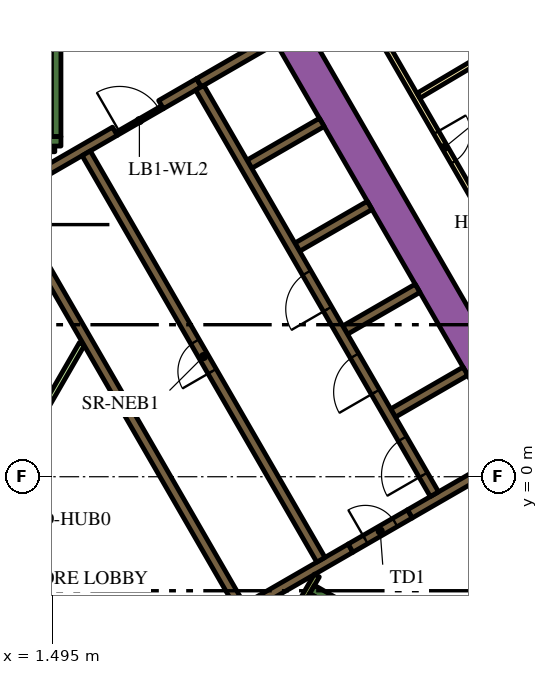
"""IFC4 building model, lengths in metres.
Left out: names, types, materials, properties, quantities, classifications, styles, units other than length and angle.
Written with IfcOpenShell. Run it as: python <this file> out.ifc"""

import sys

from ifc_helpers import new_model, si_unit, direction, frame, frame_2d, origin, place, context, subcontext, project, spatial, polyline, rectangle, outline, extrude, element, fill, save


model = new_model("IFC4")
c1 = context("Model", 3, precision=1e-05, world=origin(), true_north=direction((0.0, 1.0)))
c2 = subcontext(c1, "Body", "Model", "MODEL_VIEW")
j1 = project(units=[si_unit("LENGTHUNIT", "METRE"), si_unit("PLANEANGLEUNIT", "RADIAN")], contexts=[c1])
p1 = place(None, origin())
s1 = spatial("IfcSite", under=j1, at=p1, CompositionType="ELEMENT")
p2 = place(p1, origin())
s2 = spatial("IfcBuilding", under=s1, at=p2, CompositionType="ELEMENT")
p3 = place(p2, frame((0.0, 0.0, 83.7)))
s3 = spatial("IfcBuildingStorey", under=s2, at=p3, CompositionType="ELEMENT", Elevation=83.7)
p4 = place(p3, frame((6.776, 13.364, 0.0), z_axis=(0.0, 0.0, 1.0), x_axis=(0.500004177138, -0.8660229921, 0.0)))
e1 = element("IfcWall", 1, at=p4, inside=s3, PredefinedType="SOLIDWALL", context=c2, shape_type="SweptSolid", body=[
    extrude(rectangle(XDim=20.204, YDim=0.9, at=frame_2d((10.102, 0.0))), origin(), (0.0, 0.0, 1.0), 3.9),
])
p5 = place(p3, frame((8.334, -2.964, 0.0), z_axis=(0.0, 0.0, 1.0), x_axis=(0.866016039709, -0.500016218704, 0.0)))
e2 = element("IfcWall", 2, at=p5, inside=s3, PredefinedType="SOLIDWALL", context=c2, shape_type="SweptSolid", body=[
    extrude(rectangle(XDim=7.05, YDim=0.25, at=frame_2d((3.525, 0.0))), origin(), (0.0, 0.0, 1.0), 3.9),
])
p6 = place(p3, frame((8.168, -3.503, 0.0), z_axis=(0.0, 0.0, 1.0), x_axis=(0.49972245349, 0.866185586049, 0.0)))
e3 = element("IfcWall", 3, at=p6, inside=s3, PredefinedType="SOLIDWALL", context=c2, shape_type="SweptSolid", body=[
    extrude(rectangle(XDim=0.425, YDim=0.25, at=frame_2d((0.212, 0.0))), origin(), (0.0, 0.0, 1.0), 3.9),
])
p7 = place(p3, frame((1.6, 8.95, 0.0), z_axis=(0.0, 0.0, 1.0), x_axis=(0.0, 1.0, 0.0)))
e4 = element("IfcWall", 4, at=p7, inside=s3, PredefinedType="SOLIDWALL", context=c2, shape_type="SweptSolid", body=[
    extrude(rectangle(XDim=6.8, YDim=0.25, at=frame_2d((3.4, 0.0))), origin(), (0.0, 0.0, 1.0), 3.9),
])
p8 = place(p3, frame((1.05, 8.825, 0.0), z_axis=(0.0, 0.0, 1.0), x_axis=(1.0, 0.0, 0.0)))
e5 = element("IfcWall", 5, at=p8, inside=s3, PredefinedType="SOLIDWALL", context=c2, shape_type="SweptSolid", body=[
    extrude(rectangle(XDim=0.675, YDim=0.25, at=frame_2d((0.337, 0.0))), origin(), (0.0, 0.0, 1.0), 3.9),
])
p9 = place(p3, frame((10.464, 1.677, 0.0), z_axis=(0.0, 0.0, 1.0), x_axis=(0.86605622881, 0.499946605688, 0.0)))
e6 = element("IfcWall", 6, at=p9, inside=s3, PredefinedType="SOLIDWALL", context=c2, shape_type="SweptSolid", body=[
    extrude(rectangle(XDim=2.2, YDim=0.25, at=frame_2d((1.1, 0.0))), origin(), (0.0, 0.0, 1.0), 3.9),
])
p10 = place(p3, frame((13.629, 0.594, 0.0), z_axis=(0.0, 0.0, 1.0), x_axis=(-0.86602790099, -0.499995674689, 0.0)))
e7 = element("IfcWall", 7, at=p10, inside=s3, PredefinedType="SOLIDWALL", context=c2, shape_type="SweptSolid", body=[
    extrude(rectangle(XDim=3.146, YDim=0.25, at=frame_2d((1.573, 0.0))), origin(), (0.0, 0.0, 1.0), 3.9),
])
p11 = place(p3, origin())
e8 = element("IfcWall", 8, at=p11, inside=s3, PredefinedType="SOLIDWALL", context=c2, shape_type="SweptSolid", body=[
    extrude(outline(polyline([(0.335, 6.925), (0.335, 7.075), (0.335, 7.075), (0.335, 7.075), (0.245, 7.075), (0.079, 7.363), (0.035, 7.439), (0.252, 7.564), (0.377, 7.348), (6.552, -3.348), (6.677, -3.564), (6.46, -3.689), (4.897, -0.981), (0.332, 6.925), (0.335, 6.925), (0.335, 6.925), (0.335, 6.925)])), origin(), (0.0, 0.0, 1.0), 3.9),
])
p12 = place(p3, frame((4.358, 9.791, 0.0), z_axis=(0.0, 0.0, 1.0), x_axis=(0.866079547155, 0.499906209203, 0.0)))
e9 = element("IfcWall", 9, at=p12, inside=s3, PredefinedType="SOLIDWALL", context=c2, shape_type="SweptSolid", body=[
    extrude(rectangle(XDim=1.15, YDim=0.25, at=frame_2d((0.575, 0.0))), origin(), (0.0, 0.0, 1.0), 3.9),
])
p13 = place(p3, frame((5.356, 10.367, 0.0), z_axis=(0.0, 0.0, 1.0), x_axis=(0.865978535641, 0.50008116922, 0.0)))
e10 = element("IfcWall", 10, at=p13, inside=s3, PredefinedType="SOLIDWALL", context=c2, shape_type="SweptSolid", body=[
    extrude(rectangle(XDim=2.278, YDim=0.25, at=frame_2d((1.139, 0.0))), origin(), (0.0, 0.0, 1.0), 3.9),
])
p14 = place(p3, frame((0.314, 7.456, 0.0), z_axis=(0.0, 0.0, 1.0), x_axis=(0.866013897511, 0.50001992892, 0.0)))
e11 = element("IfcWall", 11, at=p14, inside=s3, PredefinedType="SOLIDWALL", context=c2, shape_type="SweptSolid", body=[
    extrude(rectangle(XDim=3.268, YDim=0.25, at=frame_2d((1.634, 0.0))), origin(), (0.0, 0.0, 1.0), 3.9),
])
p15 = place(p3, frame((6.614, -3.456, 0.0), z_axis=(0.0, 0.0, 1.0), x_axis=(0.86602447079, 0.500001615989, 0.0)))
e12 = element("IfcWall", 12, at=p15, inside=s3, PredefinedType="SOLIDWALL", context=c2, shape_type="SweptSolid", body=[
    extrude(rectangle(XDim=3.154, YDim=0.25, at=frame_2d((1.577, 0.0))), origin(), (0.0, 0.0, 1.0), 3.9),
])
for number, where, z_axis, x_axis in (
    (13, (6.684, 8.224, 0.0), (0.0, 0.0, 1.0), (0.866, 0.5, 0.0)),
    (14, (7.944, 6.041, 0.0), (0.0, 0.0, 1.0), (0.866, 0.5, 0.0)),
    (15, (9.204, 3.859, 0.0), (0.0, 0.0, 1.0), (0.866, 0.5, 0.0)),
):
    element("IfcWall", number, at=place(p3, frame(where, z_axis=z_axis, x_axis=x_axis)), inside=s3, PredefinedType="SOLIDWALL", context=c2, shape_type="SweptSolid", body=[
        extrude(rectangle(XDim=2.2, YDim=0.25, at=frame_2d((1.1, 0.0))), origin(), (0.0, 0.0, 1.0), 3.9),
    ])
p16 = place(p3, frame((8.459, -2.599, 0.0), z_axis=(0.0, 0.0, 1.0), x_axis=(-0.500041054325, -0.866001699761, 0.0)))
e16 = element("IfcWall", 16, at=p16, inside=s3, PredefinedType="PARTITIONING", context=c2, shape_type="SweptSolid", body=[
    extrude(rectangle(XDim=0.929, YDim=0.15, at=frame_2d((0.464, 0.0))), origin(), (0.0, 0.0, 1.0), 3.9),
])
p17 = place(p3, frame((0.645, 0.667, 0.0), z_axis=(0.0, 0.0, 1.0), x_axis=(0.499977178999, 0.866038579095, 0.0)))
e17 = element("IfcWall", 17, at=p17, inside=s3, PredefinedType="PARTITIONING", context=c2, shape_type="SweptSolid", body=[
    extrude(rectangle(XDim=3.263, YDim=0.15, at=frame_2d((1.632, 0.0))), origin(), (0.0, 0.0, 1.0), 2.75),
])
p18 = place(p3, frame((1.05, 8.625, 0.0), z_axis=(0.0, 0.0, 1.0), x_axis=(1.0, 0.0, 0.0)))
e18 = element("IfcWall", 18, at=p18, inside=s3, PredefinedType="PARTITIONING", context=c2, shape_type="SweptSolid", body=[
    extrude(rectangle(XDim=0.514, YDim=0.15, at=frame_2d((0.257, 0.0))), origin(), (0.0, 0.0, 1.0), 2.75),
])
p19 = place(p3, frame((11.553, -0.46, 0.0), z_axis=(0.0, 0.0, 1.0), x_axis=(-0.500006514828, 0.866021642414, 0.0)))
e19 = element("IfcWall", 19, at=p19, inside=s3, PredefinedType="SOLIDWALL", context=c2, shape_type="SweptSolid", body=[
    extrude(rectangle(XDim=12.35, YDim=0.25, at=frame_2d((6.175, 0.0))), origin(), (0.0, 0.0, 1.0), 3.9),
])
p20 = place(p19, frame((0.585, 0.0, 0.0)))
e20 = element("IfcOpeningElement", 20, at=p20, cuts=e19, PredefinedType="OPENING", context=c2, shape_type="SweptSolid", body=[
    extrude(rectangle(XDim=1.1, YDim=2.1, at=frame_2d((0.55, 1.05))), frame((0.0, 0.135, 0.0), z_axis=(0.0, -1.0, 0.0), x_axis=(1.0, 0.0, 0.0)), (0.0, 0.0, 1.0), 0.27),
])
p21 = place(p19, frame((3.105, 0.0, 0.0)))
e21 = element("IfcOpeningElement", 21, at=p21, cuts=e19, PredefinedType="OPENING", context=c2, shape_type="SweptSolid", body=[
    extrude(rectangle(XDim=1.1, YDim=2.1, at=frame_2d((0.55, 1.05))), frame((0.0, 0.135, 0.0), z_axis=(0.0, -1.0, 0.0), x_axis=(1.0, 0.0, 0.0)), (0.0, 0.0, 1.0), 0.27),
])
p22 = place(p19, frame((5.625, 0.0, 0.0)))
e22 = element("IfcOpeningElement", 22, at=p22, cuts=e19, PredefinedType="OPENING", context=c2, shape_type="SweptSolid", body=[
    extrude(rectangle(XDim=1.1, YDim=2.1, at=frame_2d((0.55, 1.05))), frame((0.0, 0.135, 0.0), z_axis=(0.0, -1.0, 0.0), x_axis=(1.0, 0.0, 0.0)), (0.0, 0.0, 1.0), 0.27),
])
p23 = place(p3, frame((8.565, -2.185, 0.0), z_axis=(0.0, 0.0, 1.0), x_axis=(-0.499997954832, 0.866026584559, 0.0)))
e23 = element("IfcWall", 23, at=p23, inside=s3, PredefinedType="SOLIDWALL", context=c2, shape_type="SweptSolid", body=[
    extrude(rectangle(XDim=12.35, YDim=0.25, at=frame_2d((6.175, 0.0))), origin(), (0.0, 0.0, 1.0), 3.9),
])
p24 = place(p23, frame((5.725, 0.0, 0.0)))
e24 = element("IfcOpeningElement", 24, at=p24, cuts=e23, PredefinedType="OPENING", context=c2, shape_type="SweptSolid", body=[
    extrude(rectangle(XDim=0.9, YDim=2.1, at=frame_2d((0.45, 1.05))), frame((0.0, 0.135, 0.0), z_axis=(0.0, -1.0, 0.0), x_axis=(1.0, 0.0, 0.0)), (0.0, 0.0, 1.0), 0.27),
])
p25 = place(p3, frame((9.346, -1.879, 0.0), z_axis=(0.0, 0.0, 1.0), x_axis=(0.866047807691, 0.499961193289, 0.0)))
e25 = element("IfcWall", 25, at=p25, inside=s3, PredefinedType="SOLIDWALL", context=c2, shape_type="SweptSolid", body=[
    extrude(rectangle(XDim=1.8, YDim=0.25, at=frame_2d((0.9, 0.0))), origin(), (0.0, 0.0, 1.0), 3.9),
])
p26 = place(p25, frame((0.45, 0.0, 0.0)))
e26 = element("IfcOpeningElement", 26, at=p26, cuts=e25, PredefinedType="OPENING", context=c2, shape_type="SweptSolid", body=[
    extrude(rectangle(XDim=0.9, YDim=2.1, at=frame_2d((0.45, 1.05))), frame((0.0, 0.135, 0.0), z_axis=(0.0, -1.0, 0.0), x_axis=(1.0, 0.0, 0.0)), (0.0, 0.0, 1.0), 0.27),
])
p27 = place(p3, frame((3.183, 9.02, 0.0), z_axis=(0.0, 0.0, 1.0), x_axis=(0.866034573852, 0.49998411664, 0.0)))
e27 = element("IfcWall", 27, at=p27, inside=s3, PredefinedType="PARTITIONING", context=c2, shape_type="SweptSolid", body=[
    extrude(rectangle(XDim=1.4, YDim=0.09, at=frame_2d((0.7, 0.0))), origin(), (0.0, 0.0, 1.0), 2.75),
])
p28 = place(p27, frame((0.1, 0.0, 0.0)))
e28 = element("IfcOpeningElement", 28, at=p28, cuts=e27, PredefinedType="OPENING", context=c2, shape_type="SweptSolid", body=[
    extrude(rectangle(XDim=1.2, YDim=2.1, at=frame_2d((0.6, 1.05))), frame((0.0, 0.055, 0.0), z_axis=(0.0, -1.0, 0.0), x_axis=(1.0, 0.0, 0.0)), (0.0, 0.0, 1.0), 0.11),
])
p29 = place(p3, frame((6.163, 18.475, 0.0), z_axis=(0.0, 0.0, 1.0), x_axis=(0.500001317485, -0.866024643133, 0.0)))
e29 = element("IfcWall", 29, at=p29, inside=s3, PredefinedType="PARTITIONING", context=c2, shape_type="SweptSolid", body=[
    extrude(rectangle(XDim=25.767, YDim=0.15, at=frame_2d((12.883, 0.0))), origin(), (0.0, 0.0, 1.0), 2.75),
])
p30 = place(p29, frame((24.241, 0.0, 0.0)))
e30 = element("IfcOpeningElement", 30, at=p30, cuts=e29, PredefinedType="OPENING", context=c2, shape_type="SweptSolid", body=[
    extrude(rectangle(XDim=1.0, YDim=2.1, at=frame_2d((0.5, 1.05))), frame((0.0, 0.085, 0.0), z_axis=(0.0, -1.0, 0.0), x_axis=(1.0, 0.0, 0.0)), (0.0, 0.0, 1.0), 0.17),
])
p31 = place(p29, frame((13.144, 0.0, 0.0)))
e31 = element("IfcOpeningElement", 31, at=p31, cuts=e29, PredefinedType="OPENING", context=c2, shape_type="SweptSolid", body=[
    extrude(rectangle(XDim=1.0, YDim=2.1, at=frame_2d((0.5, 1.05))), frame((0.0, 0.085, 0.0), z_axis=(0.0, -1.0, 0.0), x_axis=(1.0, 0.0, 0.0)), (0.0, 0.0, 1.0), 0.17),
])
p32 = place(p29, frame((10.874, 0.0, 0.0)))
e32 = element("IfcOpeningElement", 32, at=p32, cuts=e29, PredefinedType="OPENING", context=c2, shape_type="SweptSolid", body=[
    extrude(rectangle(XDim=0.9, YDim=2.1, at=frame_2d((0.45, 1.05))), frame((0.0, 0.085, 0.0), z_axis=(0.0, -1.0, 0.0), x_axis=(1.0, 0.0, 0.0)), (0.0, 0.0, 1.0), 0.17),
])
p33 = place(p29, frame((3.718, 0.0, 0.0)))
e33 = element("IfcOpeningElement", 33, at=p33, cuts=e29, PredefinedType="OPENING", context=c2, shape_type="SweptSolid", body=[
    extrude(rectangle(XDim=1.1, YDim=2.1, at=frame_2d((0.55, 1.05))), frame((0.0, 0.085, 0.0), z_axis=(0.0, -1.0, 0.0), x_axis=(1.0, 0.0, 0.0)), (0.0, 0.0, 1.0), 0.17),
])
p34 = place(p29, frame((2.411, 0.0, 0.0)))
e34 = element("IfcOpeningElement", 34, at=p34, cuts=e29, PredefinedType="OPENING", context=c2, shape_type="SweptSolid", body=[
    extrude(rectangle(XDim=1.0, YDim=2.1, at=frame_2d((0.5, 1.05))), frame((0.0, 0.085, 0.0), z_axis=(0.0, -1.0, 0.0), x_axis=(1.0, 0.0, 0.0)), (0.0, 0.0, 1.0), 0.17),
])
p35 = place(p3, frame((17.379, 13.731, 0.0), z_axis=(0.0, 0.0, 1.0), x_axis=(-0.860132461691, -0.510070728768, 0.0)))
e35 = element("IfcWall", 35, at=p35, inside=s3, PredefinedType="PARTITIONING", context=c2, shape_type="SweptSolid", body=[
    extrude(rectangle(XDim=7.257, YDim=0.15, at=frame_2d((3.628, 0.0))), origin(), (0.0, 0.0, 1.0), 2.75),
])
p36 = place(p20, origin())
e36 = element("IfcDoor", 36, at=p36, inside=s3, OperationType="DOUBLE_DOOR_SLIDING", PredefinedType="DOOR", context=c2, shape_type="SweptSolid", body=[
    extrude(rectangle(XDim=1.1, YDim=2.1, at=frame_2d((0.55, 1.05))), frame((0.0, 0.025, 0.0), z_axis=(0.0, -1.0, 0.0), x_axis=(1.0, 0.0, 0.0)), (0.0, 0.0, 1.0), 0.05),
])
fill(e20, e36)
p37 = place(p21, origin())
e37 = element("IfcDoor", 37, at=p37, inside=s3, OperationType="DOUBLE_DOOR_SLIDING", PredefinedType="DOOR", context=c2, shape_type="SweptSolid", body=[
    extrude(rectangle(XDim=1.1, YDim=2.1, at=frame_2d((0.55, 1.05))), frame((0.0, 0.025, 0.0), z_axis=(0.0, -1.0, 0.0), x_axis=(1.0, 0.0, 0.0)), (0.0, 0.0, 1.0), 0.05),
])
fill(e21, e37)
p38 = place(p22, origin())
e38 = element("IfcDoor", 38, at=p38, inside=s3, OperationType="DOUBLE_DOOR_SLIDING", PredefinedType="DOOR", context=c2, shape_type="SweptSolid", body=[
    extrude(rectangle(XDim=1.1, YDim=2.1, at=frame_2d((0.55, 1.05))), frame((0.0, 0.025, 0.0), z_axis=(0.0, -1.0, 0.0), x_axis=(1.0, 0.0, 0.0)), (0.0, 0.0, 1.0), 0.05),
])
fill(e22, e38)
p39 = place(p24, origin())
e39 = element("IfcDoor", 39, at=p39, inside=s3, OperationType="SINGLE_SWING_LEFT", PredefinedType="DOOR", context=c2, shape_type="SweptSolid", body=[
    extrude(rectangle(XDim=0.9, YDim=2.1, at=frame_2d((0.45, 1.05))), frame((0.0, 0.025, 0.0), z_axis=(0.0, -1.0, 0.0), x_axis=(1.0, 0.0, 0.0)), (0.0, 0.0, 1.0), 0.05),
])
fill(e24, e39)
p40 = place(p26, origin())
e40 = element("IfcDoor", 40, at=p40, inside=s3, OperationType="SINGLE_SWING_LEFT", PredefinedType="DOOR", context=c2, shape_type="SweptSolid", body=[
    extrude(rectangle(XDim=0.9, YDim=2.1, at=frame_2d((0.45, 1.05))), frame((0.0, 0.025, 0.0), z_axis=(0.0, -1.0, 0.0), x_axis=(1.0, 0.0, 0.0)), (0.0, 0.0, 1.0), 0.05),
])
fill(e26, e40)
p41 = place(p28, origin())
e41 = element("IfcDoor", 41, at=p41, inside=s3, OperationType="SINGLE_SWING_LEFT", PredefinedType="DOOR", context=c2, shape_type="SweptSolid", body=[
    extrude(rectangle(XDim=1.2, YDim=2.1, at=frame_2d((0.6, 1.05))), frame((0.0, 0.025, 0.0), z_axis=(0.0, -1.0, 0.0), x_axis=(1.0, 0.0, 0.0)), (0.0, 0.0, 1.0), 0.05),
])
fill(e28, e41)
p42 = place(p32, origin())
e42 = element("IfcDoor", 42, at=p42, inside=s3, OperationType="SINGLE_SWING_RIGHT", PredefinedType="DOOR", context=c2, shape_type="SweptSolid", body=[
    extrude(rectangle(XDim=0.9, YDim=2.1, at=frame_2d((0.45, 1.05))), frame((0.0, 0.025, 0.0), z_axis=(0.0, -1.0, 0.0), x_axis=(1.0, 0.0, 0.0)), (0.0, 0.0, 1.0), 0.05),
])
fill(e32, e42)
save(model, sys.argv[1])
